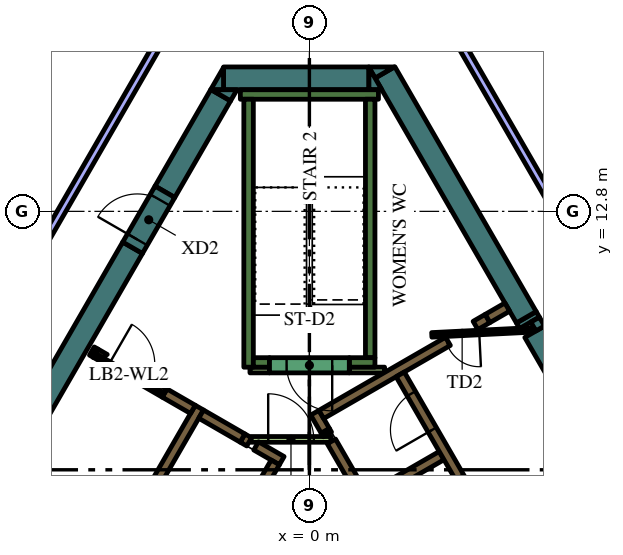
"""IFC4 building model, lengths in metres.
Left out: names, types, materials, properties, quantities, classifications, styles, units other than length and angle.
Written with IfcOpenShell. Run it as: python <this file> out.ifc"""

import sys

from ifc_helpers import new_model, si_unit, direction, frame, frame_2d, origin, place, context, subcontext, project, spatial, polyline, rectangle, outline, extrude, element, fill, save


model = new_model("IFC4")
c1 = context("Model", 3, precision=1e-05, world=origin(), true_north=direction((0.0, 1.0)))
c2 = subcontext(c1, "Body", "Model", "MODEL_VIEW")
j1 = project(units=[si_unit("LENGTHUNIT", "METRE"), si_unit("PLANEANGLEUNIT", "RADIAN")], contexts=[c1])
p1 = place(None, origin())
s1 = spatial("IfcSite", under=j1, at=p1, CompositionType="ELEMENT")
p2 = place(p1, origin())
s2 = spatial("IfcBuilding", under=s1, at=p2, CompositionType="ELEMENT")
p3 = place(p2, frame((0.0, 0.0, 267.0)))
s3 = spatial("IfcBuildingStorey", under=s2, at=p3, CompositionType="ELEMENT", Elevation=267.0)
p4 = place(p3, frame((5.709, 10.012, 0.0), z_axis=(0.0, 0.0, 1.0), x_axis=(0.500399834964, -0.865794435861, 0.0)))
e1 = element("IfcWall", 1, at=p4, inside=s3, PredefinedType="SOLIDWALL", context=c2, shape_type="SweptSolid", body=[
    extrude(rectangle(XDim=0.166, YDim=0.6, at=frame_2d((0.083, 0.0))), origin(), (0.0, 0.0, 1.0), 4.2),
])
p5 = place(p3, frame((5.928, 9.633, 0.0), z_axis=(0.0, 0.0, 1.0), x_axis=(0.499983823482, -0.8660347431, 0.0)))
e2 = element("IfcWall", 2, at=p5, inside=s3, PredefinedType="SOLIDWALL", context=c2, shape_type="SweptSolid", body=[
    extrude(rectangle(XDim=4.528, YDim=0.6, at=frame_2d((2.264, 0.0))), origin(), (0.0, 0.0, 1.0), 4.2),
])
p6 = place(p3, origin())
e3 = element("IfcWall", 3, at=p6, inside=s3, PredefinedType="SOLIDWALL", context=c2, shape_type="SweptSolid", body=[
    extrude(outline(polyline([(6.053, 10.016), (6.187, 9.784), (5.961, 9.654), (5.827, 9.886), (6.053, 10.016)])), origin(), (0.0, 0.0, 1.0), 4.2),
])
p7 = place(p3, frame((1.989, 16.456, 0.0), z_axis=(0.0, 0.0, 1.0), x_axis=(0.499990476767, -0.866030901956, 0.0)))
e4 = element("IfcWall", 4, at=p7, inside=s3, PredefinedType="SOLIDWALL", context=c2, shape_type="SweptSolid", body=[
    extrude(rectangle(XDim=7.438, YDim=0.6, at=frame_2d((3.719, 0.0))), origin(), (0.0, 0.0, 1.0), 4.2),
])
e5 = element("IfcWall", 5, at=p6, inside=s3, PredefinedType="SOLIDWALL", context=c2, shape_type="SweptSolid", body=[
    extrude(outline(polyline([(1.559, 16.6), (2.235, 16.6), (1.728, 16.307), (1.559, 16.6)])), origin(), (0.0, 0.0, 1.0), 4.2),
])
p8 = place(p3, frame((-2.258, 16.3, 0.0), z_axis=(0.0, 0.0, 1.0), x_axis=(1.0, 0.0, 0.0)))
e6 = element("IfcWall", 6, at=p8, inside=s3, PredefinedType="SOLIDWALL", context=c2, shape_type="SweptSolid", body=[
    extrude(rectangle(XDim=3.823, YDim=0.6, at=frame_2d((1.912, 0.0))), origin(), (0.0, 0.0, 1.0), 4.2),
])
e7 = element("IfcWall", 7, at=p6, inside=s3, PredefinedType="SOLIDWALL", context=c2, shape_type="SweptSolid", body=[
    extrude(outline(polyline([(1.905, 16.0), (1.567, 16.0), (1.567, 16.585), (1.905, 16.0)])), origin(), (0.0, 0.0, 1.0), 4.2),
])
e8 = element("IfcWall", 8, at=p6, inside=s3, PredefinedType="SOLIDWALL", context=c2, shape_type="SweptSolid", body=[
    extrude(outline(polyline([(-2.598, 16.0), (-2.26, 16.585), (-2.26, 16.0), (-2.598, 16.0)])), origin(), (0.0, 0.0, 1.0), 4.2),
])
p9 = place(p3, frame((-2.335, 15.855, 0.0), z_axis=(0.0, 0.0, 1.0), x_axis=(-0.499960127962, -0.866048422692, 0.0)))
e9 = element("IfcWall", 9, at=p9, inside=s3, PredefinedType="SOLIDWALL", context=c2, shape_type="SweptSolid", body=[
    extrude(rectangle(XDim=2.934, YDim=0.6, at=frame_2d((1.467, 0.0))), origin(), (0.0, 0.0, 1.0), 4.2),
])
e10 = element("IfcWall", 10, at=p6, inside=s3, PredefinedType="SOLIDWALL", context=c2, shape_type="SweptSolid", body=[
    extrude(outline(polyline([(-1.905, 16.0), (-2.074, 15.707), (-2.581, 16.0), (-1.905, 16.0)])), origin(), (0.0, 0.0, 1.0), 4.2),
])
p10 = place(p3, frame((-4.652, 11.842, 0.0), z_axis=(0.0, 0.0, 1.0), x_axis=(-0.500003640647, -0.866023301845, 0.0)))
e11 = element("IfcWall", 11, at=p10, inside=s3, PredefinedType="SOLIDWALL", context=c2, shape_type="SweptSolid", body=[
    extrude(rectangle(XDim=15.858, YDim=0.6, at=frame_2d((7.929, 0.0))), origin(), (0.0, 0.0, 1.0), 4.2),
])
p11 = place(p3, frame((-1.817, 15.875, 0.0), z_axis=(0.0, 0.0, 1.0), x_axis=(1.0, 0.0, 0.0)))
e12 = element("IfcWall", 12, at=p11, inside=s3, PredefinedType="SOLIDWALL", context=c2, shape_type="SweptSolid", body=[
    extrude(rectangle(XDim=3.634, YDim=0.25, at=frame_2d((1.817, 0.0))), origin(), (0.0, 0.0, 1.0), 4.2),
])
p12 = place(p3, frame((1.6, 8.95, 0.0), z_axis=(0.0, 0.0, 1.0), x_axis=(0.0, 1.0, 0.0)))
e13 = element("IfcWall", 13, at=p12, inside=s3, PredefinedType="SOLIDWALL", context=c2, shape_type="SweptSolid", body=[
    extrude(rectangle(XDim=6.8, YDim=0.25, at=frame_2d((3.4, 0.0))), origin(), (0.0, 0.0, 1.0), 4.2),
])
p13 = place(p3, frame((1.05, 8.825, 0.0), z_axis=(0.0, 0.0, 1.0), x_axis=(1.0, 0.0, 0.0)))
e14 = element("IfcWall", 14, at=p13, inside=s3, PredefinedType="SOLIDWALL", context=c2, shape_type="SweptSolid", body=[
    extrude(rectangle(XDim=0.675, YDim=0.25, at=frame_2d((0.337, 0.0))), origin(), (0.0, 0.0, 1.0), 4.2),
])
p14 = place(p3, frame((-1.6, 8.7, 0.0), z_axis=(0.0, 0.0, 1.0), x_axis=(0.0, 1.0, 0.0)))
e15 = element("IfcWall", 15, at=p14, inside=s3, PredefinedType="SOLIDWALL", context=c2, shape_type="SweptSolid", body=[
    extrude(rectangle(XDim=7.05, YDim=0.25, at=frame_2d((3.525, 0.0))), origin(), (0.0, 0.0, 1.0), 4.2),
])
p15 = place(p3, frame((-1.475, 8.825, 0.0), z_axis=(0.0, 0.0, 1.0), x_axis=(1.0, 0.0, 0.0)))
e16 = element("IfcWall", 16, at=p15, inside=s3, PredefinedType="SOLIDWALL", context=c2, shape_type="SweptSolid", body=[
    extrude(rectangle(XDim=0.425, YDim=0.25, at=frame_2d((0.212, 0.0))), origin(), (0.0, 0.0, 1.0), 4.2),
])
p16 = place(p3, frame((0.473, 6.93, 0.0), z_axis=(0.0, 0.0, 1.0), x_axis=(-0.49972245349, 0.866185586049, 0.0)))
e17 = element("IfcWall", 17, at=p16, inside=s3, PredefinedType="SOLIDWALL", context=c2, shape_type="SweptSolid", body=[
    extrude(rectangle(XDim=0.11, YDim=0.25, at=frame_2d((0.055, 0.0))), origin(), (0.0, 0.0, 1.0), 4.2),
])
p17 = place(p3, frame((6.568, -3.627, 0.0), z_axis=(0.0, 0.0, 1.0), x_axis=(-0.499999455981, 0.866025717874, 0.0)))
e18 = element("IfcWall", 18, at=p17, inside=s3, PredefinedType="SOLIDWALL", context=c2, shape_type="SweptSolid", body=[
    extrude(rectangle(XDim=11.978, YDim=0.25, at=frame_2d((5.989, 0.0))), origin(), (0.0, 0.0, 1.0), 4.2),
])
p18 = place(p3, frame((0.417, 7.027, 0.0), z_axis=(0.0, 0.0, 1.0), x_axis=(-0.500210807569, 0.865903659763, 0.0)))
e19 = element("IfcWall", 19, at=p18, inside=s3, PredefinedType="SOLIDWALL", context=c2, shape_type="SweptSolid", body=[
    extrude(rectangle(XDim=0.548, YDim=0.25, at=frame_2d((0.274, 0.0))), origin(), (0.0, 0.0, 1.0), 4.2),
])
p19 = place(p3, frame((3.647, 9.38, 0.0), z_axis=(0.0, 0.0, 1.0), x_axis=(-0.866025015791, -0.500000672024, 0.0)))
e20 = element("IfcWall", 20, at=p19, inside=s3, PredefinedType="SOLIDWALL", context=c2, shape_type="SweptSolid", body=[
    extrude(rectangle(XDim=3.849, YDim=0.25, at=frame_2d((1.924, 0.0))), origin(), (0.0, 0.0, 1.0), 4.2),
])
p20 = place(p3, frame((1.574, 5.274, 0.0), z_axis=(0.0, 0.0, 1.0), x_axis=(0.866028486751, 0.499994660107, 0.0)))
e21 = element("IfcWall", 21, at=p20, inside=s3, PredefinedType="SOLIDWALL", context=c2, shape_type="SweptSolid", body=[
    extrude(rectangle(XDim=2.2, YDim=0.25, at=frame_2d((1.1, 0.0))), origin(), (0.0, 0.0, 1.0), 4.2),
])
p21 = place(p3, frame((4.688, 9.981, 0.0), z_axis=(0.0, 0.0, 1.0), x_axis=(-0.865974312977, -0.500088481434, 0.0)))
e22 = element("IfcWall", 22, at=p21, inside=s3, PredefinedType="SOLIDWALL", context=c2, shape_type="SweptSolid", body=[
    extrude(rectangle(XDim=0.366, YDim=0.25, at=frame_2d((0.183, 0.0))), origin(), (0.0, 0.0, 1.0), 4.2),
])
p22 = place(p3, frame((4.689, 9.982, 0.0), z_axis=(0.0, 0.0, 1.0), x_axis=(0.865947592822, 0.500134748329, 0.0)))
e23 = element("IfcWall", 23, at=p22, inside=s3, PredefinedType="SOLIDWALL", context=c2, shape_type="SweptSolid", body=[
    extrude(rectangle(XDim=0.598, YDim=0.25, at=frame_2d((0.299, 0.0))), origin(), (0.0, 0.0, 1.0), 4.2),
])
p23 = place(p3, frame((-8.06, -1.311, 0.0), z_axis=(0.0, 0.0, 1.0), x_axis=(0.50000273126, 0.866023826885, 0.0)))
e24 = element("IfcWall", 24, at=p23, inside=s3, PredefinedType="SOLIDWALL", context=c2, shape_type="SweptSolid", body=[
    extrude(rectangle(XDim=10.33, YDim=0.25, at=frame_2d((5.165, 0.0))), origin(), (0.0, 0.0, 1.0), 4.2),
])
p24 = place(p3, frame((-1.758, 6.835, 0.0), z_axis=(0.0, 0.0, 1.0), x_axis=(0.865982457891, -0.500074377092, 0.0)))
e25 = element("IfcWall", 25, at=p24, inside=s3, PredefinedType="SOLIDWALL", context=c2, shape_type="SweptSolid", body=[
    extrude(rectangle(XDim=0.2, YDim=0.25, at=frame_2d((0.1, 0.0))), origin(), (0.0, 0.0, 1.0), 4.2),
])
p25 = place(p3, frame((-1.76, 6.836, 0.0), z_axis=(0.0, 0.0, 1.0), x_axis=(-0.865952863304, 0.500125622755, 0.0)))
e26 = element("IfcWall", 26, at=p25, inside=s3, PredefinedType="SOLIDWALL", context=c2, shape_type="SweptSolid", body=[
    extrude(rectangle(XDim=1.258, YDim=0.25, at=frame_2d((0.629, 0.0))), origin(), (0.0, 0.0, 1.0), 4.2),
])
p26 = place(p3, frame((-0.728, 6.24, 0.0), z_axis=(0.0, 0.0, 1.0), x_axis=(-0.865955664968, 0.500120771724, 0.0)))
e27 = element("IfcWall", 27, at=p26, inside=s3, PredefinedType="SOLIDWALL", context=c2, shape_type="SweptSolid", body=[
    extrude(rectangle(XDim=0.778, YDim=0.25, at=frame_2d((0.389, 0.0))), origin(), (0.0, 0.0, 1.0), 4.2),
])
p27 = place(p3, frame((-5.725, 9.125, 0.0), z_axis=(0.0, 0.0, 1.0), x_axis=(0.866185586049, -0.49972245349, 0.0)))
e28 = element("IfcWall", 28, at=p27, inside=s3, PredefinedType="SOLIDWALL", context=c2, shape_type="SweptSolid", body=[
    extrude(rectangle(XDim=0.11, YDim=0.25, at=frame_2d((0.055, 0.0))), origin(), (0.0, 0.0, 1.0), 4.2),
])
p28 = place(p3, frame((-3.066, 7.59, 0.0), z_axis=(0.0, 0.0, 1.0), x_axis=(-0.866081358704, 0.49990307071, 0.0)))
e29 = element("IfcWall", 29, at=p28, inside=s3, PredefinedType="SOLIDWALL", context=c2, shape_type="SweptSolid", body=[
    extrude(rectangle(XDim=0.858, YDim=0.25, at=frame_2d((0.429, 0.0))), origin(), (0.0, 0.0, 1.0), 4.2),
])
e30 = element("IfcWall", 30, at=p6, inside=s3, PredefinedType="SOLIDWALL", context=c2, shape_type="SweptSolid", body=[
    extrude(outline(polyline([(-3.748, 8.128), (-3.813, 8.015), (-4.027, 8.139), (-4.017, 8.156), (-4.008, 8.173), (-4.0, 8.192), (-3.995, 8.21), (-3.991, 8.23), (-3.99, 8.25), (-3.99, 8.268), (-3.748, 8.128)])), origin(), (0.0, 0.0, 1.0), 4.2),
])
e31 = element("IfcWall", 31, at=p6, inside=s3, PredefinedType="SOLIDWALL", context=c2, shape_type="SweptSolid", body=[
    extrude(outline(polyline([(-5.689, 8.96), (-5.69, 8.961), (-5.565, 9.177), (-5.319, 9.035), (-5.335, 9.026), (-5.351, 9.015), (-5.366, 9.002), (-5.379, 8.988), (-5.392, 8.972), (-5.402, 8.956), (-5.412, 8.939), (-5.629, 9.064), (-5.629, 9.064), (-5.689, 8.96)])), origin(), (0.0, 0.0, 1.0), 4.2),
])
p29 = place(p3, frame((1.05, 8.625, 0.0), z_axis=(0.0, 0.0, 1.0), x_axis=(1.0, 0.0, 0.0)))
e32 = element("IfcWall", 32, at=p29, inside=s3, PredefinedType="PARTITIONING", context=c2, shape_type="SweptSolid", body=[
    extrude(rectangle(XDim=0.929, YDim=0.15, at=frame_2d((0.464, 0.0))), origin(), (0.0, 0.0, 1.0), 3.55),
])
p30 = place(p3, frame((-1.564, 8.625, 0.0), z_axis=(0.0, 0.0, 1.0), x_axis=(1.0, 0.0, 0.0)))
e33 = element("IfcWall", 33, at=p30, inside=s3, PredefinedType="PARTITIONING", context=c2, shape_type="SweptSolid", body=[
    extrude(rectangle(XDim=0.514, YDim=0.15, at=frame_2d((0.257, 0.0))), origin(), (0.0, 0.0, 1.0), 3.55),
])
p31 = place(p3, frame((8.565, -2.185, 0.0), z_axis=(0.0, 0.0, 1.0), x_axis=(-0.499997954832, 0.866026584559, 0.0)))
e34 = element("IfcWall", 34, at=p31, inside=s3, PredefinedType="SOLIDWALL", context=c2, shape_type="SweptSolid", body=[
    extrude(rectangle(XDim=12.35, YDim=0.25, at=frame_2d((6.175, 0.0))), origin(), (0.0, 0.0, 1.0), 4.2),
])
p32 = place(p31, frame((0.685, 0.0, 0.0)))
e35 = element("IfcOpeningElement", 35, at=p32, cuts=e34, PredefinedType="OPENING", context=c2, shape_type="SweptSolid", body=[
    extrude(rectangle(XDim=0.9, YDim=2.1, at=frame_2d((0.45, 1.05))), frame((0.0, 0.135, 0.0), z_axis=(0.0, -1.0, 0.0), x_axis=(1.0, 0.0, 0.0)), (0.0, 0.0, 1.0), 0.27),
])
p33 = place(p31, frame((3.105, 0.0, 0.0)))
e36 = element("IfcOpeningElement", 36, at=p33, cuts=e34, PredefinedType="OPENING", context=c2, shape_type="SweptSolid", body=[
    extrude(rectangle(XDim=1.1, YDim=2.1, at=frame_2d((0.55, 1.05))), frame((0.0, 0.135, 0.0), z_axis=(0.0, -1.0, 0.0), x_axis=(1.0, 0.0, 0.0)), (0.0, 0.0, 1.0), 0.27),
])
p34 = place(p31, frame((5.625, 0.0, 0.0)))
e37 = element("IfcOpeningElement", 37, at=p34, cuts=e34, PredefinedType="OPENING", context=c2, shape_type="SweptSolid", body=[
    extrude(rectangle(XDim=1.1, YDim=2.1, at=frame_2d((0.55, 1.05))), frame((0.0, 0.135, 0.0), z_axis=(0.0, -1.0, 0.0), x_axis=(1.0, 0.0, 0.0)), (0.0, 0.0, 1.0), 0.27),
])
p35 = place(p31, frame((8.145, 0.0, 0.0)))
e38 = element("IfcOpeningElement", 38, at=p35, cuts=e34, PredefinedType="OPENING", context=c2, shape_type="SweptSolid", body=[
    extrude(rectangle(XDim=1.1, YDim=2.1, at=frame_2d((0.55, 1.05))), frame((0.0, 0.135, 0.0), z_axis=(0.0, -1.0, 0.0), x_axis=(1.0, 0.0, 0.0)), (0.0, 0.0, 1.0), 0.27),
])
p36 = place(p31, frame((10.665, 0.0, 0.0)))
e39 = element("IfcOpeningElement", 39, at=p36, cuts=e34, PredefinedType="OPENING", context=c2, shape_type="SweptSolid", body=[
    extrude(rectangle(XDim=1.1, YDim=2.1, at=frame_2d((0.55, 1.05))), frame((0.0, 0.135, 0.0), z_axis=(0.0, -1.0, 0.0), x_axis=(1.0, 0.0, 0.0)), (0.0, 0.0, 1.0), 0.27),
])
p37 = place(p3, frame((-0.898, 6.194, 0.0), z_axis=(0.0, 0.0, 1.0), x_axis=(-0.499996202215, -0.866027596426, 0.0)))
e40 = element("IfcWall", 40, at=p37, inside=s3, PredefinedType="SOLIDWALL", context=c2, shape_type="SweptSolid", body=[
    extrude(rectangle(XDim=9.83, YDim=0.25, at=frame_2d((4.915, 0.0))), origin(), (0.0, 0.0, 1.0), 4.2),
])
p38 = place(p37, frame((0.585, 0.0, 0.0)))
e41 = element("IfcOpeningElement", 41, at=p38, cuts=e40, PredefinedType="OPENING", context=c2, shape_type="SweptSolid", body=[
    extrude(rectangle(XDim=1.1, YDim=2.1, at=frame_2d((0.55, 1.05))), frame((0.0, 0.135, 0.0), z_axis=(0.0, -1.0, 0.0), x_axis=(1.0, 0.0, 0.0)), (0.0, 0.0, 1.0), 0.27),
])
p39 = place(p37, frame((3.105, 0.0, 0.0)))
e42 = element("IfcOpeningElement", 42, at=p39, cuts=e40, PredefinedType="OPENING", context=c2, shape_type="SweptSolid", body=[
    extrude(rectangle(XDim=1.1, YDim=2.1, at=frame_2d((0.55, 1.05))), frame((0.0, 0.135, 0.0), z_axis=(0.0, -1.0, 0.0), x_axis=(1.0, 0.0, 0.0)), (0.0, 0.0, 1.0), 0.27),
])
p40 = place(p37, frame((5.625, 0.0, 0.0)))
e43 = element("IfcOpeningElement", 43, at=p40, cuts=e40, PredefinedType="OPENING", context=c2, shape_type="SweptSolid", body=[
    extrude(rectangle(XDim=1.1, YDim=2.1, at=frame_2d((0.55, 1.05))), frame((0.0, 0.135, 0.0), z_axis=(0.0, -1.0, 0.0), x_axis=(1.0, 0.0, 0.0)), (0.0, 0.0, 1.0), 0.27),
])
p41 = place(p37, frame((8.145, 0.0, 0.0)))
e44 = element("IfcOpeningElement", 44, at=p41, cuts=e40, PredefinedType="OPENING", context=c2, shape_type="SweptSolid", body=[
    extrude(rectangle(XDim=1.1, YDim=2.1, at=frame_2d((0.55, 1.05))), frame((0.0, 0.135, 0.0), z_axis=(0.0, -1.0, 0.0), x_axis=(1.0, 0.0, 0.0)), (0.0, 0.0, 1.0), 0.27),
])
p42 = place(p3, frame((1.05, 8.75, 0.0), z_axis=(0.0, 0.0, 1.0), x_axis=(-1.0, 0.0, 0.0)))
e45 = element("IfcWall", 45, at=p42, inside=s3, PredefinedType="SOLIDWALL", context=c2, shape_type="SweptSolid", body=[
    extrude(rectangle(XDim=2.1, YDim=0.4, at=frame_2d((1.05, 0.0))), origin(), (0.0, 0.0, 1.0), 4.2),
])
p43 = place(p42, frame((0.45, 0.0, 0.0)))
e46 = element("IfcOpeningElement", 46, at=p43, cuts=e45, PredefinedType="OPENING", context=c2, shape_type="SweptSolid", body=[
    extrude(rectangle(XDim=1.2, YDim=2.1, at=frame_2d((0.6, 1.05))), frame((0.0, 0.21, 0.0), z_axis=(0.0, -1.0, 0.0), x_axis=(1.0, 0.0, 0.0)), (0.0, 0.0, 1.0), 0.42),
])
p44 = place(p3, frame((5.917, 9.684, 0.0), z_axis=(0.0, 0.0, 1.0), x_axis=(-0.998758194515, -0.049820366212, 0.0)))
e47 = element("IfcWall", 47, at=p44, inside=s3, PredefinedType="PARTITIONING", context=c2, shape_type="SweptSolid", body=[
    extrude(rectangle(XDim=2.7, YDim=0.12, at=frame_2d((1.35, 0.0))), origin(), (0.0, 0.0, 1.0), 3.55),
])
p45 = place(p44, frame((1.45, 0.0, 0.0)))
e48 = element("IfcOpeningElement", 48, at=p45, cuts=e47, PredefinedType="OPENING", context=c2, shape_type="SweptSolid", body=[
    extrude(rectangle(XDim=0.9, YDim=2.1, at=frame_2d((0.45, 1.05))), frame((0.0, 0.07, 0.0), z_axis=(0.0, -1.0, 0.0), x_axis=(1.0, 0.0, 0.0)), (0.0, 0.0, 1.0), 0.14),
])
p46 = place(p3, frame((-1.534, 6.8, 0.0), z_axis=(0.0, 0.0, 1.0), x_axis=(1.0, 0.0, 0.0)))
e49 = element("IfcWall", 49, at=p46, inside=s3, PredefinedType="PARTITIONING", context=c2, shape_type="SweptSolid", body=[
    extrude(rectangle(XDim=2.1, YDim=0.15, at=frame_2d((1.05, 0.0))), origin(), (0.0, 0.0, 1.0), 3.55),
])
p47 = place(p46, frame((0.45, 0.0, 0.0)))
e50 = element("IfcOpeningElement", 50, at=p47, cuts=e49, PredefinedType="OPENING", context=c2, shape_type="SweptSolid", body=[
    extrude(rectangle(XDim=1.2, YDim=2.1, at=frame_2d((0.6, 1.05))), frame((0.0, 0.085, 0.0), z_axis=(0.0, -1.0, 0.0), x_axis=(1.0, 0.0, 0.0)), (0.0, 0.0, 1.0), 0.17),
])
p48 = place(p3, frame((-5.659, 9.012, 0.0), z_axis=(0.0, 0.0, 1.0), x_axis=(0.866009402589, -0.500027713859, 0.0)))
e51 = element("IfcWall", 51, at=p48, inside=s3, PredefinedType="PARTITIONING", context=c2, shape_type="SweptSolid", body=[
    extrude(rectangle(XDim=2.1, YDim=0.12, at=frame_2d((1.05, 0.0))), origin(), (0.0, 0.0, 1.0), 3.55),
])
p49 = place(p48, frame((0.45, 0.0, 0.0)))
e52 = element("IfcOpeningElement", 52, at=p49, cuts=e51, PredefinedType="OPENING", context=c2, shape_type="SweptSolid", body=[
    extrude(rectangle(XDim=1.2, YDim=2.1, at=frame_2d((0.6, 1.05))), frame((0.0, 0.07, 0.0), z_axis=(0.0, -1.0, 0.0), x_axis=(1.0, 0.0, 0.0)), (0.0, 0.0, 1.0), 0.14),
])
p50 = place(p3, frame((-4.652, 11.842, 0.0), z_axis=(0.0, 0.0, 1.0), x_axis=(0.500062241894, 0.865989465428, 0.0)))
e53 = element("IfcWall", 53, at=p50, inside=s3, PredefinedType="SOLIDWALL", context=c2, shape_type="SweptSolid", body=[
    extrude(rectangle(XDim=1.7, YDim=0.6, at=frame_2d((0.85, 0.0))), origin(), (0.0, 0.0, 1.0), 4.2),
])
p51 = place(p50, frame((0.25, 0.0, 0.0)))
e54 = element("IfcOpeningElement", 54, at=p51, cuts=e53, PredefinedType="OPENING", context=c2, shape_type="SweptSolid", body=[
    extrude(rectangle(XDim=1.2, YDim=2.1, at=frame_2d((0.6, 1.05))), frame((0.0, 0.31, 0.0), z_axis=(0.0, -1.0, 0.0), x_axis=(1.0, 0.0, 0.0)), (0.0, 0.0, 1.0), 0.62),
])
p52 = place(p3, frame((7.188, 11.65, 0.0), z_axis=(0.0, 0.0, 1.0), x_axis=(-0.499989634868, 0.866031388014, 0.0)))
e55 = element("IfcWall", 55, at=p52, inside=s3, PredefinedType="PARTITIONING", context=c2, shape_type="SweptSolid", body=[
    extrude(rectangle(XDim=7.303, YDim=0.2, at=frame_2d((3.652, 0.0))), origin(), (0.0, 0.0, 1.0), 3.55),
])
p53 = place(p3, frame((-7.962, 15.8, 0.0), z_axis=(0.0, 0.0, 1.0), x_axis=(0.599528135832, 0.800353680785, 0.0)))
e56 = element("IfcWall", 56, at=p53, inside=s3, PredefinedType="PARTITIONING", context=c2, shape_type="SweptSolid", body=[
    extrude(rectangle(XDim=5.217, YDim=0.15, at=frame_2d((2.608, 0.0))), origin(), (0.0, 0.0, 1.0), 3.55),
])
p54 = place(p53, frame((2.116, 0.0, 0.0)))
e57 = element("IfcOpeningElement", 57, at=p54, cuts=e56, PredefinedType="OPENING", context=c2, shape_type="SweptSolid", body=[
    extrude(rectangle(XDim=0.9, YDim=2.1, at=frame_2d((0.45, 1.05))), frame((0.0, 0.085, 0.0), z_axis=(0.0, -1.0, 0.0), x_axis=(1.0, 0.0, 0.0)), (0.0, 0.0, 1.0), 0.17),
])
p55 = place(p3, frame((-3.306, 18.374, 0.0), z_axis=(0.0, 0.0, 1.0), x_axis=(-0.499999798456, -0.866025520146, 0.0)))
e58 = element("IfcWall", 58, at=p55, inside=s3, PredefinedType="PARTITIONING", context=c2, shape_type="SweptSolid", body=[
    extrude(rectangle(XDim=8.229, YDim=0.2, at=frame_2d((4.115, 0.0))), origin(), (0.0, 0.0, 1.0), 3.55),
])
p56 = place(p36, origin())
e59 = element("IfcDoor", 59, at=p56, inside=s3, OperationType="DOUBLE_DOOR_SLIDING", PredefinedType="DOOR", context=c2, shape_type="SweptSolid", body=[
    extrude(rectangle(XDim=1.1, YDim=2.1, at=frame_2d((0.55, 1.05))), frame((0.0, 0.025, 0.0), z_axis=(0.0, -1.0, 0.0), x_axis=(1.0, 0.0, 0.0)), (0.0, 0.0, 1.0), 0.05),
])
fill(e39, e59)
p57 = place(p43, origin())
e60 = element("IfcDoor", 60, at=p57, inside=s3, OperationType="SINGLE_SWING_LEFT", PredefinedType="DOOR", context=c2, shape_type="SweptSolid", body=[
    extrude(rectangle(XDim=1.2, YDim=2.1, at=frame_2d((0.6, 1.05))), frame((0.0, 0.025, 0.0), z_axis=(0.0, -1.0, 0.0), x_axis=(1.0, 0.0, 0.0)), (0.0, 0.0, 1.0), 0.05),
])
fill(e46, e60)
p58 = place(p45, origin())
e61 = element("IfcDoor", 61, at=p58, inside=s3, OperationType="SINGLE_SWING_LEFT", PredefinedType="DOOR", context=c2, shape_type="SweptSolid", body=[
    extrude(rectangle(XDim=0.9, YDim=2.1, at=frame_2d((0.45, 1.05))), frame((0.0, 0.025, 0.0), z_axis=(0.0, -1.0, 0.0), x_axis=(1.0, 0.0, 0.0)), (0.0, 0.0, 1.0), 0.05),
])
fill(e48, e61)
p59 = place(p47, origin())
e62 = element("IfcDoor", 62, at=p59, inside=s3, OperationType="SINGLE_SWING_LEFT", PredefinedType="DOOR", context=c2, shape_type="SweptSolid", body=[
    extrude(rectangle(XDim=1.2, YDim=2.1, at=frame_2d((0.6, 1.05))), frame((0.0, 0.025, 0.0), z_axis=(0.0, -1.0, 0.0), x_axis=(1.0, 0.0, 0.0)), (0.0, 0.0, 1.0), 0.05),
])
fill(e50, e62)
p60 = place(p49, origin())
e63 = element("IfcDoor", 63, at=p60, inside=s3, OperationType="SINGLE_SWING_LEFT", PredefinedType="DOOR", context=c2, shape_type="SweptSolid", body=[
    extrude(rectangle(XDim=1.2, YDim=2.1, at=frame_2d((0.6, 1.05))), frame((0.0, 0.025, 0.0), z_axis=(0.0, -1.0, 0.0), x_axis=(1.0, 0.0, 0.0)), (0.0, 0.0, 1.0), 0.05),
])
fill(e52, e63)
p61 = place(p51, origin())
e64 = element("IfcDoor", 64, at=p61, inside=s3, OperationType="SINGLE_SWING_LEFT", PredefinedType="DOOR", context=c2, shape_type="SweptSolid", body=[
    extrude(rectangle(XDim=1.2, YDim=2.1, at=frame_2d((0.6, 1.05))), frame((0.0, 0.025, 0.0), z_axis=(0.0, -1.0, 0.0), x_axis=(1.0, 0.0, 0.0)), (0.0, 0.0, 1.0), 0.05),
])
fill(e54, e64)
save(model, sys.argv[1])
